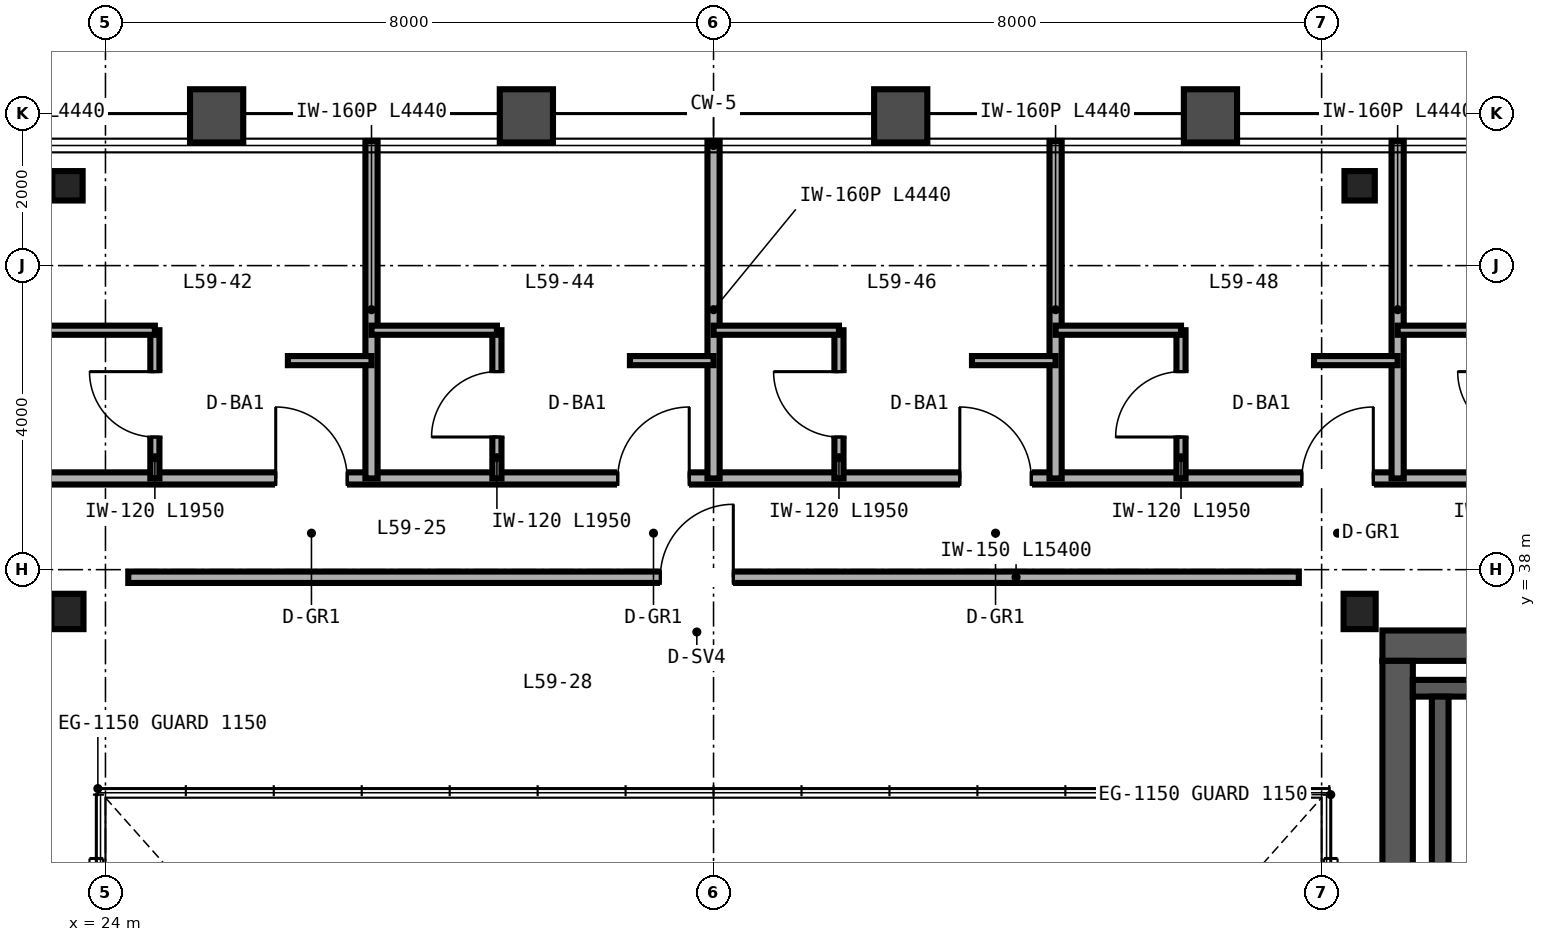
"""IFC4 building model, lengths in metres.
Left out: names, types, materials, properties, quantities, classifications, styles, units other than length and angle.
Written with IfcOpenShell. Run it as: python <this file> out.ifc"""

import sys

from ifc_helpers import new_model, si_unit, direction, frame, frame_2d, origin, origin_2d, place, context, subcontext, project, spatial, rectangle, i_section, extrude, source, transform, mapped, element, fill, save


model = new_model("IFC4")
c1 = context("Model", 3, precision=1e-05, world=origin(), true_north=direction((0.0, 1.0)))
c2 = subcontext(c1, "Body", "Model", "MODEL_VIEW")
j1 = project(units=[si_unit("LENGTHUNIT", "METRE"), si_unit("PLANEANGLEUNIT", "RADIAN")], contexts=[c1])
p1 = place(None, origin())
s1 = spatial("IfcSite", under=j1, at=p1, CompositionType="ELEMENT")
p2 = place(p1, origin())
s2 = spatial("IfcBuilding", under=s1, at=p2, CompositionType="ELEMENT")
p3 = place(p2, frame((0.0, 0.0, 236.4)))
s3 = spatial("IfcBuildingStorey", under=s2, at=p3, CompositionType="ELEMENT", Elevation=236.4)
p4 = place(p3, frame((40.8, 37.0, 0.0), z_axis=(0.0, 0.0, 1.0), x_axis=(1.0, 0.0, 0.0)))
e1 = element("IfcWall", 1, at=p4, inside=s3, PredefinedType="SHEAR", context=c2, shape_type="SweptSolid", body=[
    extrude(rectangle(XDim=12.4, YDim=0.4, at=frame_2d((6.2, 0.0))), origin(), (0.0, 0.0, 1.0), 3.38),
])
p5 = place(p4, frame((9.9, 0.0, 0.0)))
e2 = element("IfcOpeningElement", 2, at=p5, cuts=e1, PredefinedType="OPENING", context=c2, shape_type="SweptSolid", body=[
    extrude(rectangle(XDim=1.1, YDim=2.15, at=frame_2d((0.55, 1.075))), frame((0.0, 0.21, 0.0), z_axis=(0.0, -1.0, 0.0), x_axis=(1.0, 0.0, 0.0)), (0.0, 0.0, 1.0), 0.42),
])
p6 = place(p3, frame((41.0, 15.2, 0.0), z_axis=(0.0, 0.0, 1.0), x_axis=(0.0, 1.0, 0.0)))
e3 = element("IfcWall", 3, at=p6, inside=s3, PredefinedType="SHEAR", context=c2, shape_type="SweptSolid", body=[
    extrude(rectangle(XDim=21.6, YDim=0.4, at=frame_2d((10.8, 0.0))), origin(), (0.0, 0.0, 1.0), 3.38),
])
p7 = place(p3, frame((41.2, 36.44, 0.0), z_axis=(0.0, 0.0, 1.0), x_axis=(1.0, 0.0, 0.0)))
e4 = element("IfcWall", 4, at=p7, inside=s3, PredefinedType="SHEAR", context=c2, shape_type="SweptSolid", body=[
    extrude(rectangle(XDim=8.11, YDim=0.22, at=frame_2d((4.055, 0.0))), origin(), (0.0, 0.0, 1.0), 3.4),
])
p8 = place(p3, frame((41.56, 33.05, 0.0), z_axis=(0.0, 0.0, 1.0), x_axis=(0.0, 1.0, 0.0)))
e5 = element("IfcWall", 5, at=p8, inside=s3, PredefinedType="SHEAR", context=c2, shape_type="SweptSolid", body=[
    extrude(rectangle(XDim=3.28, YDim=0.22, at=frame_2d((1.64, 0.0))), origin(), (0.0, 0.0, 1.0), 3.4),
])
m1 = source(origin(), c2, "Body", "SweptSolid", [
    extrude(i_section(OverallWidth=0.422, OverallDepth=0.465, WebThickness=0.045, FlangeThickness=0.073, FilletRadius=0.025, at=origin_2d()), origin(), (0.0, 0.0, 1.0), 3.38),
])
for number, where, z_axis, x_axis in (
    (6, (23.5, 37.45, 0.0), (0.0, 0.0, 1.0), (1.0, 0.0, 0.0)),
    (7, (40.5, 37.45, 0.0), (0.0, 0.0, 1.0), (1.0, 0.0, 0.0)),
):
    element("IfcColumn", number, at=place(p3, frame(where, z_axis=z_axis, x_axis=x_axis)), inside=s3, PredefinedType="COLUMN", context=c2, shape_type="MappedRepresentation", body=[
        mapped(m1, transform((0.0, 0.0, 0.0), scale=1.0)),
    ])
m2 = source(origin(), c2, "Body", "SweptSolid", [
    extrude(i_section(OverallWidth=0.399, OverallDepth=0.387, WebThickness=0.021, FlangeThickness=0.033, FilletRadius=0.025, at=origin_2d()), origin(), (0.0, 0.0, 1.0), 3.38),
])
for number, where, z_axis, x_axis in (
    (8, (23.5, 43.05, 0.0), (0.0, 0.0, 1.0), (1.0, 0.0, 0.0)),
    (9, (40.5, 43.05, 0.0), (0.0, 0.0, 1.0), (1.0, 0.0, 0.0)),
):
    element("IfcColumn", number, at=place(p3, frame(where, z_axis=z_axis, x_axis=x_axis)), inside=s3, PredefinedType="COLUMN", context=c2, shape_type="MappedRepresentation", body=[
        mapped(m2, transform((0.0, 0.0, 0.0), scale=1.0)),
    ])
p9 = place(p3, frame((24.3, 37.9, 0.0), z_axis=(0.0, 0.0, 1.0), x_axis=(1.0, 0.0, 0.0)))
e10 = element("IfcWall", 10, at=p9, inside=s3, PredefinedType="PARTITIONING", context=c2, shape_type="SweptSolid", body=[
    extrude(rectangle(XDim=15.4, YDim=0.15, at=frame_2d((7.7, 0.0))), origin(), (0.0, 0.0, 1.0), 3.38),
])
p10 = place(p9, frame((7.0, 0.0, 0.0)))
e11 = element("IfcOpeningElement", 11, at=p10, cuts=e10, PredefinedType="OPENING", context=c2, shape_type="SweptSolid", body=[
    extrude(rectangle(XDim=0.96, YDim=2.15, at=frame_2d((0.48, 1.075))), frame((0.0, 0.085, 0.0), z_axis=(0.0, -1.0, 0.0), x_axis=(1.0, 0.0, 0.0)), (0.0, 0.0, 1.0), 0.17),
])
p11 = place(p3, frame((14.0, 39.2, 0.0), z_axis=(0.0, 0.0, 1.0), x_axis=(1.0, 0.0, 0.0)))
e12 = element("IfcWall", 12, at=p11, inside=s3, PredefinedType="PARTITIONING", context=c2, shape_type="SweptSolid", body=[
    extrude(rectangle(XDim=36.0, YDim=0.16, at=frame_2d((18.0, 0.0))), origin(), (0.0, 0.0, 1.0), 2.923),
])
p12 = place(p11, frame((3.24, 0.0, 0.0)))
e13 = element("IfcOpeningElement", 13, at=p12, cuts=e12, PredefinedType="OPENING", context=c2, shape_type="SweptSolid", body=[
    extrude(rectangle(XDim=0.94, YDim=2.15, at=frame_2d((0.47, 1.075))), frame((0.0, 0.09, 0.0), z_axis=(0.0, -1.0, 0.0), x_axis=(1.0, 0.0, 0.0)), (0.0, 0.0, 1.0), 0.18),
])
p13 = place(p11, frame((7.74, 0.0, 0.0)))
e14 = element("IfcOpeningElement", 14, at=p13, cuts=e12, PredefinedType="OPENING", context=c2, shape_type="SweptSolid", body=[
    extrude(rectangle(XDim=0.94, YDim=2.15, at=frame_2d((0.47, 1.075))), frame((0.0, 0.09, 0.0), z_axis=(0.0, -1.0, 0.0), x_axis=(1.0, 0.0, 0.0)), (0.0, 0.0, 1.0), 0.18),
])
p14 = place(p11, frame((12.24, 0.0, 0.0)))
e15 = element("IfcOpeningElement", 15, at=p14, cuts=e12, PredefinedType="OPENING", context=c2, shape_type="SweptSolid", body=[
    extrude(rectangle(XDim=0.94, YDim=2.15, at=frame_2d((0.47, 1.075))), frame((0.0, 0.09, 0.0), z_axis=(0.0, -1.0, 0.0), x_axis=(1.0, 0.0, 0.0)), (0.0, 0.0, 1.0), 0.18),
])
p15 = place(p11, frame((16.74, 0.0, 0.0)))
e16 = element("IfcOpeningElement", 16, at=p15, cuts=e12, PredefinedType="OPENING", context=c2, shape_type="SweptSolid", body=[
    extrude(rectangle(XDim=0.94, YDim=2.15, at=frame_2d((0.47, 1.075))), frame((0.0, 0.09, 0.0), z_axis=(0.0, -1.0, 0.0), x_axis=(1.0, 0.0, 0.0)), (0.0, 0.0, 1.0), 0.18),
])
p16 = place(p11, frame((21.24, 0.0, 0.0)))
e17 = element("IfcOpeningElement", 17, at=p16, cuts=e12, PredefinedType="OPENING", context=c2, shape_type="SweptSolid", body=[
    extrude(rectangle(XDim=0.94, YDim=2.15, at=frame_2d((0.47, 1.075))), frame((0.0, 0.09, 0.0), z_axis=(0.0, -1.0, 0.0), x_axis=(1.0, 0.0, 0.0)), (0.0, 0.0, 1.0), 0.18),
])
p17 = place(p11, frame((25.74, 0.0, 0.0)))
e18 = element("IfcOpeningElement", 18, at=p17, cuts=e12, PredefinedType="OPENING", context=c2, shape_type="SweptSolid", body=[
    extrude(rectangle(XDim=0.94, YDim=2.15, at=frame_2d((0.47, 1.075))), frame((0.0, 0.09, 0.0), z_axis=(0.0, -1.0, 0.0), x_axis=(1.0, 0.0, 0.0)), (0.0, 0.0, 1.0), 0.18),
])
p18 = place(p11, frame((30.24, 0.0, 0.0)))
e19 = element("IfcOpeningElement", 19, at=p18, cuts=e12, PredefinedType="OPENING", context=c2, shape_type="SweptSolid", body=[
    extrude(rectangle(XDim=0.94, YDim=2.15, at=frame_2d((0.47, 1.075))), frame((0.0, 0.09, 0.0), z_axis=(0.0, -1.0, 0.0), x_axis=(1.0, 0.0, 0.0)), (0.0, 0.0, 1.0), 0.18),
])
p19 = place(p11, frame((34.74, 0.0, 0.0)))
e20 = element("IfcOpeningElement", 20, at=p19, cuts=e12, PredefinedType="OPENING", context=c2, shape_type="SweptSolid", body=[
    extrude(rectangle(XDim=0.94, YDim=2.15, at=frame_2d((0.47, 1.075))), frame((0.0, 0.09, 0.0), z_axis=(0.0, -1.0, 0.0), x_axis=(1.0, 0.0, 0.0)), (0.0, 0.0, 1.0), 0.18),
])
p20 = place(p3, frame((27.5, 39.2, 0.0), z_axis=(0.0, 0.0, 1.0), x_axis=(0.0, 1.0, 0.0)))
e21 = element("IfcWall", 21, at=p20, inside=s3, PredefinedType="PARTITIONING", context=c2, shape_type="SweptSolid", body=[
    extrude(rectangle(XDim=4.44, YDim=0.16, at=frame_2d((2.22, 0.0))), origin(), (0.0, 0.0, 1.0), 2.453),
])
p21 = place(p3, frame((24.65, 39.2, 0.0), z_axis=(0.0, 0.0, 1.0), x_axis=(0.0, 1.0, 0.0)))
e22 = element("IfcWall", 22, at=p21, inside=s3, PredefinedType="PARTITIONING", context=c2, shape_type="SweptSolid", body=[
    extrude(rectangle(XDim=1.95, YDim=0.12, at=frame_2d((0.975, 0.0))), origin(), (0.0, 0.0, 1.0), 3.38),
])
p22 = place(p21, frame((0.545, 0.0, 0.0)))
e23 = element("IfcOpeningElement", 23, at=p22, cuts=e22, PredefinedType="OPENING", context=c2, shape_type="SweptSolid", body=[
    extrude(rectangle(XDim=0.86, YDim=2.1, at=frame_2d((0.43, 1.05))), frame((0.0, 0.07, 0.0), z_axis=(0.0, -1.0, 0.0), x_axis=(1.0, 0.0, 0.0)), (0.0, 0.0, 1.0), 0.14),
])
p23 = place(p3, frame((23.0, 41.15, 0.0), z_axis=(0.0, 0.0, 1.0), x_axis=(1.0, 0.0, 0.0)))
e24 = element("IfcWall", 24, at=p23, inside=s3, PredefinedType="PARTITIONING", context=c2, shape_type="SweptSolid", body=[
    extrude(rectangle(XDim=1.65, YDim=0.12, at=frame_2d((0.825, 0.0))), origin(), (0.0, 0.0, 1.0), 2.923),
])
p24 = place(p3, frame((26.4, 40.75, 0.0), z_axis=(0.0, 0.0, 1.0), x_axis=(1.0, 0.0, 0.0)))
e25 = element("IfcWall", 25, at=p24, inside=s3, PredefinedType="PARTITIONING", context=c2, shape_type="SweptSolid", body=[
    extrude(rectangle(XDim=1.1, YDim=0.12, at=frame_2d((0.55, 0.0))), origin(), (0.0, 0.0, 1.0), 3.38),
])
p25 = place(p3, frame((32.0, 39.2, 0.0), z_axis=(0.0, 0.0, 1.0), x_axis=(0.0, 1.0, 0.0)))
e26 = element("IfcWall", 26, at=p25, inside=s3, PredefinedType="PARTITIONING", context=c2, shape_type="SweptSolid", body=[
    extrude(rectangle(XDim=4.44, YDim=0.16, at=frame_2d((2.22, 0.0))), origin(), (0.0, 0.0, 1.0), 2.453),
])
p26 = place(p3, frame((29.15, 39.2, 0.0), z_axis=(0.0, 0.0, 1.0), x_axis=(0.0, 1.0, 0.0)))
e27 = element("IfcWall", 27, at=p26, inside=s3, PredefinedType="PARTITIONING", context=c2, shape_type="SweptSolid", body=[
    extrude(rectangle(XDim=1.95, YDim=0.12, at=frame_2d((0.975, 0.0))), origin(), (0.0, 0.0, 1.0), 3.38),
])
p27 = place(p26, frame((0.545, 0.0, 0.0)))
e28 = element("IfcOpeningElement", 28, at=p27, cuts=e27, PredefinedType="OPENING", context=c2, shape_type="SweptSolid", body=[
    extrude(rectangle(XDim=0.86, YDim=2.1, at=frame_2d((0.43, 1.05))), frame((0.0, 0.07, 0.0), z_axis=(0.0, -1.0, 0.0), x_axis=(1.0, 0.0, 0.0)), (0.0, 0.0, 1.0), 0.14),
])
p28 = place(p3, frame((27.5, 41.15, 0.0), z_axis=(0.0, 0.0, 1.0), x_axis=(1.0, 0.0, 0.0)))
e29 = element("IfcWall", 29, at=p28, inside=s3, PredefinedType="PARTITIONING", context=c2, shape_type="SweptSolid", body=[
    extrude(rectangle(XDim=1.65, YDim=0.12, at=frame_2d((0.825, 0.0))), origin(), (0.0, 0.0, 1.0), 3.38),
])
p29 = place(p3, frame((30.9, 40.75, 0.0), z_axis=(0.0, 0.0, 1.0), x_axis=(1.0, 0.0, 0.0)))
e30 = element("IfcWall", 30, at=p29, inside=s3, PredefinedType="PARTITIONING", context=c2, shape_type="SweptSolid", body=[
    extrude(rectangle(XDim=1.1, YDim=0.12, at=frame_2d((0.55, 0.0))), origin(), (0.0, 0.0, 1.0), 3.38),
])
p30 = place(p3, frame((36.5, 39.2, 0.0), z_axis=(0.0, 0.0, 1.0), x_axis=(0.0, 1.0, 0.0)))
e31 = element("IfcWall", 31, at=p30, inside=s3, PredefinedType="PARTITIONING", context=c2, shape_type="SweptSolid", body=[
    extrude(rectangle(XDim=4.44, YDim=0.16, at=frame_2d((2.22, 0.0))), origin(), (0.0, 0.0, 1.0), 2.453),
])
p31 = place(p3, frame((33.65, 39.2, 0.0), z_axis=(0.0, 0.0, 1.0), x_axis=(0.0, 1.0, 0.0)))
e32 = element("IfcWall", 32, at=p31, inside=s3, PredefinedType="PARTITIONING", context=c2, shape_type="SweptSolid", body=[
    extrude(rectangle(XDim=1.95, YDim=0.12, at=frame_2d((0.975, 0.0))), origin(), (0.0, 0.0, 1.0), 3.38),
])
p32 = place(p31, frame((0.545, 0.0, 0.0)))
e33 = element("IfcOpeningElement", 33, at=p32, cuts=e32, PredefinedType="OPENING", context=c2, shape_type="SweptSolid", body=[
    extrude(rectangle(XDim=0.86, YDim=2.1, at=frame_2d((0.43, 1.05))), frame((0.0, 0.07, 0.0), z_axis=(0.0, -1.0, 0.0), x_axis=(1.0, 0.0, 0.0)), (0.0, 0.0, 1.0), 0.14),
])
p33 = place(p3, frame((32.0, 41.15, 0.0), z_axis=(0.0, 0.0, 1.0), x_axis=(1.0, 0.0, 0.0)))
e34 = element("IfcWall", 34, at=p33, inside=s3, PredefinedType="PARTITIONING", context=c2, shape_type="SweptSolid", body=[
    extrude(rectangle(XDim=1.65, YDim=0.12, at=frame_2d((0.825, 0.0))), origin(), (0.0, 0.0, 1.0), 3.38),
])
p34 = place(p3, frame((35.4, 40.75, 0.0), z_axis=(0.0, 0.0, 1.0), x_axis=(1.0, 0.0, 0.0)))
e35 = element("IfcWall", 35, at=p34, inside=s3, PredefinedType="PARTITIONING", context=c2, shape_type="SweptSolid", body=[
    extrude(rectangle(XDim=1.1, YDim=0.12, at=frame_2d((0.55, 0.0))), origin(), (0.0, 0.0, 1.0), 3.38),
])
p35 = place(p3, frame((41.0, 39.2, 0.0), z_axis=(0.0, 0.0, 1.0), x_axis=(0.0, 1.0, 0.0)))
e36 = element("IfcWall", 36, at=p35, inside=s3, PredefinedType="PARTITIONING", context=c2, shape_type="SweptSolid", body=[
    extrude(rectangle(XDim=4.44, YDim=0.16, at=frame_2d((2.22, 0.0))), origin(), (0.0, 0.0, 1.0), 2.843),
])
p36 = place(p3, frame((38.15, 39.2, 0.0), z_axis=(0.0, 0.0, 1.0), x_axis=(0.0, 1.0, 0.0)))
e37 = element("IfcWall", 37, at=p36, inside=s3, PredefinedType="PARTITIONING", context=c2, shape_type="SweptSolid", body=[
    extrude(rectangle(XDim=1.95, YDim=0.12, at=frame_2d((0.975, 0.0))), origin(), (0.0, 0.0, 1.0), 3.38),
])
p37 = place(p36, frame((0.545, 0.0, 0.0)))
e38 = element("IfcOpeningElement", 38, at=p37, cuts=e37, PredefinedType="OPENING", context=c2, shape_type="SweptSolid", body=[
    extrude(rectangle(XDim=0.86, YDim=2.1, at=frame_2d((0.43, 1.05))), frame((0.0, 0.07, 0.0), z_axis=(0.0, -1.0, 0.0), x_axis=(1.0, 0.0, 0.0)), (0.0, 0.0, 1.0), 0.14),
])
p38 = place(p3, frame((36.5, 41.15, 0.0), z_axis=(0.0, 0.0, 1.0), x_axis=(1.0, 0.0, 0.0)))
e39 = element("IfcWall", 39, at=p38, inside=s3, PredefinedType="PARTITIONING", context=c2, shape_type="SweptSolid", body=[
    extrude(rectangle(XDim=1.65, YDim=0.12, at=frame_2d((0.825, 0.0))), origin(), (0.0, 0.0, 1.0), 3.38),
])
p39 = place(p3, frame((39.9, 40.75, 0.0), z_axis=(0.0, 0.0, 1.0), x_axis=(1.0, 0.0, 0.0)))
e40 = element("IfcWall", 40, at=p39, inside=s3, PredefinedType="PARTITIONING", context=c2, shape_type="SweptSolid", body=[
    extrude(rectangle(XDim=1.1, YDim=0.12, at=frame_2d((0.55, 0.0))), origin(), (0.0, 0.0, 1.0), 2.923),
])
p40 = place(p3, frame((41.0, 41.15, 0.0), z_axis=(0.0, 0.0, 1.0), x_axis=(1.0, 0.0, 0.0)))
e41 = element("IfcWall", 41, at=p40, inside=s3, PredefinedType="PARTITIONING", context=c2, shape_type="SweptSolid", body=[
    extrude(rectangle(XDim=1.65, YDim=0.12, at=frame_2d((0.825, 0.0))), origin(), (0.0, 0.0, 1.0), 3.38),
])
m3 = source(origin(), c2, "Body", "SweptSolid", [
    extrude(rectangle(XDim=0.96, YDim=2.15, at=frame_2d((0.48, 1.075))), frame((0.0, 0.025, 0.0), z_axis=(0.0, -1.0, 0.0), x_axis=(1.0, 0.0, 0.0)), (0.0, 0.0, 1.0), 0.05),
])
p41 = place(p10, origin())
e42 = element("IfcDoor", 42, at=p41, inside=s3, OperationType="SINGLE_SWING_RIGHT", PredefinedType="DOOR", context=c2, shape_type="MappedRepresentation", body=[
    mapped(m3, transform((0.0, 0.0, 0.0), scale=1.0)),
])
fill(e11, e42)
m4 = source(origin(), c2, "Body", "SweptSolid", [
    extrude(rectangle(XDim=0.86, YDim=2.1, at=frame_2d((0.43, 1.05))), frame((0.0, 0.025, 0.0), z_axis=(0.0, -1.0, 0.0), x_axis=(1.0, 0.0, 0.0)), (0.0, 0.0, 1.0), 0.05),
])
p42 = place(p22, origin())
e43 = element("IfcDoor", 43, at=p42, inside=s3, OperationType="SINGLE_SWING_RIGHT", PredefinedType="DOOR", context=c2, shape_type="MappedRepresentation", body=[
    mapped(m4, transform((0.0, 0.0, 0.0), scale=1.0)),
])
fill(e23, e43)
p43 = place(p27, origin())
e44 = element("IfcDoor", 44, at=p43, inside=s3, OperationType="SINGLE_SWING_LEFT", PredefinedType="DOOR", context=c2, shape_type="MappedRepresentation", body=[
    mapped(m4, transform((0.0, 0.0, 0.0), scale=1.0)),
])
fill(e28, e44)
p44 = place(p32, origin())
e45 = element("IfcDoor", 45, at=p44, inside=s3, OperationType="SINGLE_SWING_RIGHT", PredefinedType="DOOR", context=c2, shape_type="MappedRepresentation", body=[
    mapped(m4, transform((0.0, 0.0, 0.0), scale=1.0)),
])
fill(e33, e45)
p45 = place(p37, origin())
e46 = element("IfcDoor", 46, at=p45, inside=s3, OperationType="SINGLE_SWING_LEFT", PredefinedType="DOOR", context=c2, shape_type="MappedRepresentation", body=[
    mapped(m4, transform((0.0, 0.0, 0.0), scale=1.0)),
])
fill(e38, e46)
m5 = source(origin(), c2, "Body", "SweptSolid", [
    extrude(rectangle(XDim=0.94, YDim=2.15, at=frame_2d((0.47, 1.075))), frame((0.0, 0.025, 0.0), z_axis=(0.0, -1.0, 0.0), x_axis=(1.0, 0.0, 0.0)), (0.0, 0.0, 1.0), 0.05),
])
p46 = place(p14, origin())
e47 = element("IfcDoor", 47, at=p46, inside=s3, OperationType="SINGLE_SWING_LEFT", PredefinedType="DOOR", context=c2, shape_type="MappedRepresentation", body=[
    mapped(m5, transform((0.0, 0.0, 0.0), scale=1.0)),
])
fill(e15, e47)
p47 = place(p15, origin())
e48 = element("IfcDoor", 48, at=p47, inside=s3, OperationType="SINGLE_SWING_RIGHT", PredefinedType="DOOR", context=c2, shape_type="MappedRepresentation", body=[
    mapped(m5, transform((0.0, 0.0, 0.0), scale=1.0)),
])
fill(e16, e48)
p48 = place(p16, origin())
e49 = element("IfcDoor", 49, at=p48, inside=s3, OperationType="SINGLE_SWING_LEFT", PredefinedType="DOOR", context=c2, shape_type="MappedRepresentation", body=[
    mapped(m5, transform((0.0, 0.0, 0.0), scale=1.0)),
])
fill(e17, e49)
p49 = place(p17, origin())
e50 = element("IfcDoor", 50, at=p49, inside=s3, OperationType="SINGLE_SWING_RIGHT", PredefinedType="DOOR", context=c2, shape_type="MappedRepresentation", body=[
    mapped(m5, transform((0.0, 0.0, 0.0), scale=1.0)),
])
fill(e18, e50)
save(model, sys.argv[1])
